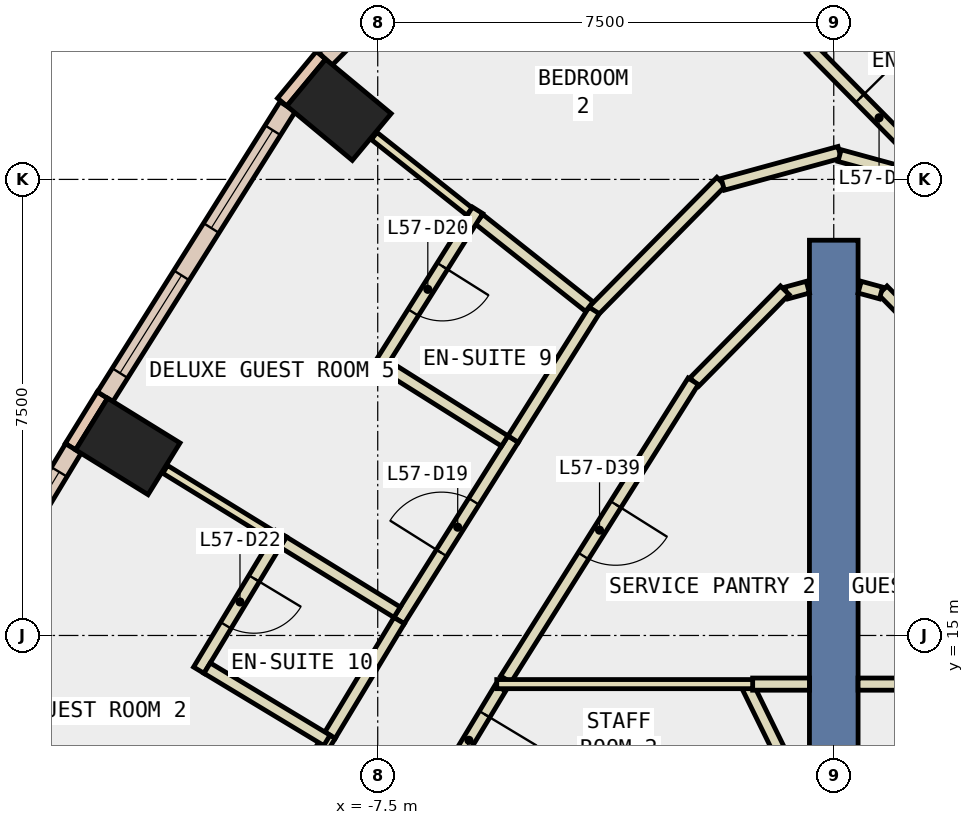
"""IFC4 building model, lengths in metres.
Left out: names, types, materials, properties, quantities, classifications, styles, units other than length and angle.
Written with IfcOpenShell. Run it as: python <this file> out.ifc"""

import sys

from ifc_helpers import new_model, si_unit, direction, frame, frame_2d, origin, origin_2d, place, context, subcontext, project, spatial, rectangle, extrude, element, fill, save


model = new_model("IFC4")
c1 = context("Model", 3, precision=1e-05, world=origin(), true_north=direction((0.0, 1.0)))
c2 = subcontext(c1, "Body", "Model", "MODEL_VIEW")
j1 = project(units=[si_unit("LENGTHUNIT", "METRE"), si_unit("PLANEANGLEUNIT", "RADIAN")], contexts=[c1])
p1 = place(None, origin())
s1 = spatial("IfcSite", under=j1, at=p1, CompositionType="ELEMENT")
p2 = place(p1, origin())
s2 = spatial("IfcBuilding", under=s1, at=p2, CompositionType="ELEMENT")
p3 = place(p2, frame((0.0, 0.0, 252.2)))
s3 = spatial("IfcBuildingStorey", under=s2, at=p3, CompositionType="ELEMENT", Elevation=252.2)
for number, where, z_axis, x_axis in (
    (1, (-8.137, 23.645, -0.34), (0.0, 0.0, 1.0), (0.639, 0.769, 0.0)),
    (2, (-11.61, 18.109, -0.34), (0.0, 0.0, 1.0), (0.526, 0.851, 0.0)),
):
    element("IfcColumn", number, at=place(p3, frame(where, z_axis=z_axis, x_axis=x_axis)), inside=s3, PredefinedType="COLUMN", context=c2, shape_type="SweptSolid", body=[
        extrude(rectangle(XDim=1.0, YDim=1.4, at=origin_2d()), origin(), (0.0, 0.0, 1.0), 3.6),
    ])
p4 = place(p3, frame((0.0, 12.5, -0.34), z_axis=(0.0, 0.0, 1.0), x_axis=(0.0, 1.0, 0.0)))
e3 = element("IfcWall", 3, at=p4, inside=s3, PredefinedType="SHEAR", context=c2, shape_type="SweptSolid", body=[
    extrude(rectangle(XDim=9.0, YDim=0.8, at=frame_2d((4.5, 0.0))), origin(), (0.0, 0.0, 1.0), 3.6),
])
p5 = place(p3, frame((-8.433, 24.541, 0.0), z_axis=(0.0, 0.0, 1.0), x_axis=(-0.637972365578, -0.770059257953, 0.0)))
e4 = element("IfcWall", 4, at=p5, inside=s3, PredefinedType="STANDARD", context=c2, shape_type="SweptSolid", body=[
    extrude(rectangle(XDim=1.0, YDim=0.2, at=frame_2d((0.5, 0.0))), origin(), (0.0, 0.0, 1.0), 3.26),
])
p6 = place(p3, frame((-12.028, 18.955, 0.0), z_axis=(0.0, 0.0, 1.0), x_axis=(-0.525648735675, -0.850701714282, 0.0)))
e5 = element("IfcWall", 5, at=p6, inside=s3, PredefinedType="STANDARD", context=c2, shape_type="SweptSolid", body=[
    extrude(rectangle(XDim=1.0, YDim=0.2, at=frame_2d((0.5, 0.0))), origin(), (0.0, 0.0, 1.0), 3.26),
])
p7 = place(p3, frame((-5.455, 27.424, 0.0), z_axis=(0.0, 0.0, 1.0), x_axis=(-0.702488411246, -0.711695181989, 0.0)))
e6 = element("IfcWall", 6, at=p7, inside=s3, PredefinedType="STANDARD", context=c2, shape_type="SweptSolid", body=[
    extrude(rectangle(XDim=4.137, YDim=0.3, at=frame_2d((2.068, 0.0))), origin(), (0.0, 0.0, 1.0), 3.26),
])
p8 = place(p7, frame((1.368, 0.0, 0.9)))
e7 = element("IfcOpeningElement", 7, at=p8, cuts=e6, PredefinedType="OPENING", context=c2, shape_type="SweptSolid", body=[
    extrude(rectangle(XDim=1.4, YDim=2.0, at=frame_2d((0.7, 1.0))), frame((0.0, 0.16, 0.0), z_axis=(0.0, -1.0, 0.0), x_axis=(1.0, 0.0, 0.0)), (0.0, 0.0, 1.0), 0.32),
])
p9 = place(p3, frame((-8.981, 23.697, 0.0), z_axis=(0.0, 0.0, 1.0), x_axis=(-0.532558226688, -0.846393369059, 0.0)))
e8 = element("IfcWall", 8, at=p9, inside=s3, PredefinedType="STANDARD", context=c2, shape_type="SweptSolid", body=[
    extrude(rectangle(XDim=5.637, YDim=0.3, at=frame_2d((2.818, 0.0))), origin(), (0.0, 0.0, 1.0), 3.26),
])
p10 = place(p9, frame((0.459, 0.0, 0.9)))
e9 = element("IfcOpeningElement", 9, at=p10, cuts=e8, PredefinedType="OPENING", context=c2, shape_type="SweptSolid", body=[
    extrude(rectangle(XDim=1.9, YDim=2.0, at=frame_2d((0.95, 1.0))), frame((0.0, 0.16, 0.0), z_axis=(0.0, -1.0, 0.0), x_axis=(1.0, 0.0, 0.0)), (0.0, 0.0, 1.0), 0.32),
])
p11 = place(p9, frame((3.278, 0.0, 0.9)))
e10 = element("IfcOpeningElement", 10, at=p11, cuts=e8, PredefinedType="OPENING", context=c2, shape_type="SweptSolid", body=[
    extrude(rectangle(XDim=1.9, YDim=2.0, at=frame_2d((0.95, 1.0))), frame((0.0, 0.16, 0.0), z_axis=(0.0, -1.0, 0.0), x_axis=(1.0, 0.0, 0.0)), (0.0, 0.0, 1.0), 0.32),
])
p12 = place(p3, frame((-12.506, 18.076, 0.0), z_axis=(0.0, 0.0, 1.0), x_axis=(-0.516269519619, -0.856426169096, 0.0)))
e11 = element("IfcWall", 11, at=p12, inside=s3, PredefinedType="STANDARD", context=c2, shape_type="SweptSolid", body=[
    extrude(rectangle(XDim=5.603, YDim=0.3, at=frame_2d((2.802, 0.0))), origin(), (0.0, 0.0, 1.0), 3.26),
])
p13 = place(p12, frame((0.451, 0.0, 0.9)))
e12 = element("IfcOpeningElement", 12, at=p13, cuts=e11, PredefinedType="OPENING", context=c2, shape_type="SweptSolid", body=[
    extrude(rectangle(XDim=1.9, YDim=2.0, at=frame_2d((0.95, 1.0))), frame((0.0, 0.16, 0.0), z_axis=(0.0, -1.0, 0.0), x_axis=(1.0, 0.0, 0.0)), (0.0, 0.0, 1.0), 0.32),
])
p14 = place(p12, frame((3.253, 0.0, 0.9)))
e13 = element("IfcOpeningElement", 13, at=p14, cuts=e11, PredefinedType="OPENING", context=c2, shape_type="SweptSolid", body=[
    extrude(rectangle(XDim=1.9, YDim=2.0, at=frame_2d((0.95, 1.0))), frame((0.0, 0.16, 0.0), z_axis=(0.0, -1.0, 0.0), x_axis=(1.0, 0.0, 0.0)), (0.0, 0.0, 1.0), 0.32),
])
p15 = place(p3, frame((-0.6, 12.5, 0.0), z_axis=(0.0, 0.0, 1.0), x_axis=(-0.440531456598, 0.897737175206, 0.0)))
e14 = element("IfcWall", 14, at=p15, inside=s3, PredefinedType="PARTITIONING", context=c2, shape_type="SweptSolid", body=[
    extrude(rectangle(XDim=1.918, YDim=0.2, at=frame_2d((0.959, 0.0))), origin(), (0.0, 0.0, 1.0), 3.26),
])
p16 = place(p3, frame((-5.482, 14.136, 0.0), z_axis=(0.0, 0.0, 1.0), x_axis=(-0.516156559549, -0.856494253357, 0.0)))
e15 = element("IfcWall", 15, at=p16, inside=s3, PredefinedType="PARTITIONING", context=c2, shape_type="SweptSolid", body=[
    extrude(rectangle(XDim=2.009, YDim=0.2, at=frame_2d((1.005, 0.0))), origin(), (0.0, 0.0, 1.0), 3.26),
])
p17 = place(p16, frame((0.504, 0.0, 0.0)))
e16 = element("IfcOpeningElement", 16, at=p17, cuts=e15, PredefinedType="OPENING", context=c2, shape_type="SweptSolid", body=[
    extrude(rectangle(XDim=1.0, YDim=2.1, at=frame_2d((0.5, 1.05))), frame((0.0, 0.11, 0.0), z_axis=(0.0, -1.0, 0.0), x_axis=(1.0, 0.0, 0.0)), (0.0, 0.0, 1.0), 0.22),
])
p18 = place(p3, frame((0.4, 14.2, 0.0), z_axis=(0.0, 0.0, 1.0), x_axis=(1.0, 0.0, 0.0)))
e17 = element("IfcWall", 17, at=p18, inside=s3, PredefinedType="PARTITIONING", context=c2, shape_type="SweptSolid", body=[
    extrude(rectangle(XDim=5.143, YDim=0.2, at=frame_2d((2.572, 0.0))), origin(), (0.0, 0.0, 1.0), 3.26),
])
p19 = place(p3, frame((2.294, 19.167, 0.0), z_axis=(0.0, 0.0, 1.0), x_axis=(-0.70213913596, 0.712039769784, 0.0)))
e18 = element("IfcWall", 18, at=p19, inside=s3, PredefinedType="PARTITIONING", context=c2, shape_type="SweptSolid", body=[
    extrude(rectangle(XDim=2.121, YDim=0.2, at=frame_2d((1.06, 0.0))), origin(), (0.0, 0.0, 1.0), 3.26),
])
p20 = place(p3, frame((0.778, 20.632, 0.0), z_axis=(0.0, 0.0, 1.0), x_axis=(-0.964810127056, 0.262947558899, 0.0)))
e19 = element("IfcWall", 19, at=p20, inside=s3, PredefinedType="PARTITIONING", context=c2, shape_type="SweptSolid", body=[
    extrude(rectangle(XDim=0.365, YDim=0.2, at=frame_2d((0.183, 0.0))), origin(), (0.0, 0.0, 1.0), 3.26),
])
p21 = place(p3, frame((-1.334, 14.2, 0.0), z_axis=(0.0, 0.0, 1.0), x_axis=(1.0, 0.0, 0.0)))
e20 = element("IfcWall", 20, at=p21, inside=s3, PredefinedType="PARTITIONING", context=c2, shape_type="SweptSolid", body=[
    extrude(rectangle(XDim=0.934, YDim=0.2, at=frame_2d((0.467, 0.0))), origin(), (0.0, 0.0, 1.0), 3.26),
])
p22 = place(p3, frame((-0.426, 20.728, 0.0), z_axis=(0.0, 0.0, 1.0), x_axis=(-0.964810127056, -0.262947558899, 0.0)))
e21 = element("IfcWall", 21, at=p22, inside=s3, PredefinedType="PARTITIONING", context=c2, shape_type="SweptSolid", body=[
    extrude(rectangle(XDim=0.365, YDim=0.2, at=frame_2d((0.183, 0.0))), origin(), (0.0, 0.0, 1.0), 3.26),
])
p23 = place(p3, frame((-0.805, 20.677, 0.0), z_axis=(0.0, 0.0, 1.0), x_axis=(-0.70213913596, -0.712039769784, 0.0)))
e22 = element("IfcWall", 22, at=p23, inside=s3, PredefinedType="PARTITIONING", context=c2, shape_type="SweptSolid", body=[
    extrude(rectangle(XDim=2.121, YDim=0.2, at=frame_2d((1.06, 0.0))), origin(), (0.0, 0.0, 1.0), 3.26),
])
p24 = place(p3, frame((-2.311, 19.181, 0.0), z_axis=(0.0, 0.0, 1.0), x_axis=(-0.532551510955, -0.846397594621, 0.0)))
e23 = element("IfcWall", 23, at=p24, inside=s3, PredefinedType="PARTITIONING", context=c2, shape_type="SweptSolid", body=[
    extrude(rectangle(XDim=5.789, YDim=0.2, at=frame_2d((2.895, 0.0))), origin(), (0.0, 0.0, 1.0), 3.26),
])
p25 = place(p24, frame((2.394, 0.0, 0.0)))
e24 = element("IfcOpeningElement", 24, at=p25, cuts=e23, PredefinedType="OPENING", context=c2, shape_type="SweptSolid", body=[
    extrude(rectangle(XDim=1.0, YDim=2.1, at=frame_2d((0.5, 1.05))), frame((0.0, 0.11, 0.0), z_axis=(0.0, -1.0, 0.0), x_axis=(1.0, 0.0, 0.0)), (0.0, 0.0, 1.0), 0.22),
])
p26 = place(p3, frame((-4.012, 20.275, 0.0), z_axis=(0.0, 0.0, 1.0), x_axis=(0.702488437915, 0.711695155664, 0.0)))
e25 = element("IfcWall", 25, at=p26, inside=s3, PredefinedType="PARTITIONING", context=c2, shape_type="SweptSolid", body=[
    extrude(rectangle(XDim=3.076, YDim=0.2, at=frame_2d((1.538, 0.0))), origin(), (0.0, 0.0, 1.0), 3.26),
])
p27 = place(p3, frame((-1.825, 22.419, 0.0), z_axis=(0.0, 0.0, 1.0), x_axis=(0.964477541401, 0.26416485787, 0.0)))
e26 = element("IfcWall", 26, at=p27, inside=s3, PredefinedType="PARTITIONING", context=c2, shape_type="SweptSolid", body=[
    extrude(rectangle(XDim=1.992, YDim=0.2, at=frame_2d((0.996, 0.0))), origin(), (0.0, 0.0, 1.0), 3.26),
])
p28 = place(p3, frame((0.096, 22.892, 0.0), z_axis=(0.0, 0.0, 1.0), x_axis=(0.964519582336, -0.264011316595, 0.0)))
e27 = element("IfcWall", 27, at=p28, inside=s3, PredefinedType="PARTITIONING", context=c2, shape_type="SweptSolid", body=[
    extrude(rectangle(XDim=1.849, YDim=0.2, at=frame_2d((0.924, 0.0))), origin(), (0.0, 0.0, 1.0), 3.26),
])
p29 = place(p3, frame((-7.15, 15.246, 0.0), z_axis=(0.0, 0.0, 1.0), x_axis=(0.532449518014, 0.846461759778, 0.0)))
e28 = element("IfcWall", 28, at=p29, inside=s3, PredefinedType="PARTITIONING", context=c2, shape_type="SweptSolid", body=[
    extrude(rectangle(XDim=3.525, YDim=0.2, at=frame_2d((1.763, 0.0))), origin(), (0.0, 0.0, 1.0), 3.26),
])
p30 = place(p29, frame((1.313, 0.0, 0.0)))
e29 = element("IfcOpeningElement", 29, at=p30, cuts=e28, PredefinedType="OPENING", context=c2, shape_type="SweptSolid", body=[
    extrude(rectangle(XDim=1.0, YDim=2.1, at=frame_2d((0.5, 1.05))), frame((0.0, 0.11, 0.0), z_axis=(0.0, -1.0, 0.0), x_axis=(1.0, 0.0, 0.0)), (0.0, 0.0, 1.0), 0.22),
])
p31 = place(p3, frame((-5.273, 18.23, 0.0), z_axis=(0.0, 0.0, 1.0), x_axis=(0.532743344325, 0.846276863135, 0.0)))
e30 = element("IfcWall", 30, at=p31, inside=s3, PredefinedType="PARTITIONING", context=c2, shape_type="SweptSolid", body=[
    extrude(rectangle(XDim=2.5, YDim=0.2, at=frame_2d((1.25, 0.0))), origin(), (0.0, 0.0, 1.0), 3.26),
])
p32 = place(p3, frame((-10.498, 9.689, 0.0), z_axis=(0.0, 0.0, 1.0), x_axis=(0.516353342298, 0.856375633643, 0.0)))
e31 = element("IfcWall", 31, at=p32, inside=s3, PredefinedType="PARTITIONING", context=c2, shape_type="SweptSolid", body=[
    extrude(rectangle(XDim=4.288, YDim=0.2, at=frame_2d((2.144, 0.0))), origin(), (0.0, 0.0, 1.0), 3.26),
])
p33 = place(p32, frame((1.694, 0.0, 0.0)))
e32 = element("IfcOpeningElement", 32, at=p33, cuts=e31, PredefinedType="OPENING", context=c2, shape_type="SweptSolid", body=[
    extrude(rectangle(XDim=1.0, YDim=2.1, at=frame_2d((0.5, 1.05))), frame((0.0, 0.11, 0.0), z_axis=(0.0, -1.0, 0.0), x_axis=(1.0, 0.0, 0.0)), (0.0, 0.0, 1.0), 0.22),
])
p34 = place(p3, frame((-8.284, 13.361, 0.0), z_axis=(0.0, 0.0, 1.0), x_axis=(0.516354965559, 0.856374654893, 0.0)))
e33 = element("IfcWall", 33, at=p34, inside=s3, PredefinedType="PARTITIONING", context=c2, shape_type="SweptSolid", body=[
    extrude(rectangle(XDim=2.2, YDim=0.2, at=frame_2d((1.1, 0.0))), origin(), (0.0, 0.0, 1.0), 3.26),
])
p35 = place(p3, frame((-1.334, 14.2, 0.0), z_axis=(0.0, 0.0, 1.0), x_axis=(-1.0, 0.0, 0.0)))
e34 = element("IfcWall", 34, at=p35, inside=s3, PredefinedType="PARTITIONING", context=c2, shape_type="SweptSolid", body=[
    extrude(rectangle(XDim=4.209, YDim=0.15, at=frame_2d((2.104, 0.0))), origin(), (0.0, 0.0, 1.0), 3.26),
])
p36 = place(p3, frame((1.506, 26.372, 0.0), z_axis=(0.0, 0.0, 1.0), x_axis=(-0.711773999329, -0.702408551969, 0.0)))
e35 = element("IfcWall", 35, at=p36, inside=s3, PredefinedType="PARTITIONING", context=c2, shape_type="SweptSolid", body=[
    extrude(rectangle(XDim=2.45, YDim=0.2, at=frame_2d((1.225, 0.0))), origin(), (0.0, 0.0, 1.0), 3.26),
])
p37 = place(p3, frame((-0.379, 24.652, 0.0), z_axis=(0.0, 0.0, 1.0), x_axis=(0.702559610983, -0.711624896286, 0.0)))
e36 = element("IfcWall", 36, at=p37, inside=s3, PredefinedType="PARTITIONING", context=c2, shape_type="SweptSolid", body=[
    extrude(rectangle(XDim=3.124, YDim=0.2, at=frame_2d((1.562, 0.0))), origin(), (0.0, 0.0, 1.0), 3.26),
])
p38 = place(p37, frame((1.15, 0.0, 0.0)))
e37 = element("IfcOpeningElement", 37, at=p38, cuts=e36, PredefinedType="OPENING", context=c2, shape_type="SweptSolid", body=[
    extrude(rectangle(XDim=0.9, YDim=2.1, at=frame_2d((0.45, 1.05))), frame((0.0, 0.11, 0.0), z_axis=(0.0, -1.0, 0.0), x_axis=(1.0, 0.0, 0.0)), (0.0, 0.0, 1.0), 0.22),
])
p39 = place(p3, frame((-5.99, 21.97, 0.0), z_axis=(0.0, 0.0, 1.0), x_axis=(-0.783573405437, 0.621299218003, 0.0)))
e38 = element("IfcWall", 38, at=p39, inside=s3, PredefinedType="PARTITIONING", context=c2, shape_type="SweptSolid", body=[
    extrude(rectangle(XDim=2.002, YDim=0.15, at=frame_2d((1.001, 0.0))), origin(), (0.0, 0.0, 1.0), 3.26),
])
p40 = place(p3, frame((-4.02, 20.408, 0.0), z_axis=(0.0, 0.0, 1.0), x_axis=(-0.783681902275, 0.621162358846, 0.0)))
e39 = element("IfcWall", 39, at=p40, inside=s3, PredefinedType="PARTITIONING", context=c2, shape_type="SweptSolid", body=[
    extrude(rectangle(XDim=2.313, YDim=0.2, at=frame_2d((1.157, 0.0))), origin(), (0.0, 0.0, 1.0), 3.26),
])
p41 = place(p3, frame((-5.858, 21.992, 0.0), z_axis=(0.0, 0.0, 1.0), x_axis=(-0.532874387162, -0.846194355634, 0.0)))
e40 = element("IfcWall", 40, at=p41, inside=s3, PredefinedType="PARTITIONING", context=c2, shape_type="SweptSolid", body=[
    extrude(rectangle(XDim=3.073, YDim=0.2, at=frame_2d((1.536, 0.0))), origin(), (0.0, 0.0, 1.0), 3.26),
])
p42 = place(p41, frame((1.086, 0.0, 0.0)))
e41 = element("IfcOpeningElement", 41, at=p42, cuts=e40, PredefinedType="OPENING", context=c2, shape_type="SweptSolid", body=[
    extrude(rectangle(XDim=0.9, YDim=2.1, at=frame_2d((0.45, 1.05))), frame((0.0, 0.11, 0.0), z_axis=(0.0, -1.0, 0.0), x_axis=(1.0, 0.0, 0.0)), (0.0, 0.0, 1.0), 0.22),
])
p43 = place(p3, frame((-7.357, 19.423, 0.0), z_axis=(0.0, 0.0, 1.0), x_axis=(0.846270070045, -0.532754135176, 0.0)))
e42 = element("IfcWall", 42, at=p43, inside=s3, PredefinedType="PARTITIONING", context=c2, shape_type="SweptSolid", body=[
    extrude(rectangle(XDim=2.3, YDim=0.2, at=frame_2d((1.15, 0.0))), origin(), (0.0, 0.0, 1.0), 3.26),
])
p44 = place(p3, frame((-9.225, 16.641, 0.0), z_axis=(0.0, 0.0, 1.0), x_axis=(-0.85144868382, 0.524437926566, 0.0)))
e43 = element("IfcWall", 43, at=p44, inside=s3, PredefinedType="PARTITIONING", context=c2, shape_type="SweptSolid", body=[
    extrude(rectangle(XDim=2.08, YDim=0.15, at=frame_2d((1.04, 0.0))), origin(), (0.0, 0.0, 1.0), 3.26),
])
p45 = place(p3, frame((-7.182, 15.383, 0.0), z_axis=(0.0, 0.0, 1.0), x_axis=(-0.851498142432, 0.524357619792, 0.0)))
e44 = element("IfcWall", 44, at=p45, inside=s3, PredefinedType="PARTITIONING", context=c2, shape_type="SweptSolid", body=[
    extrude(rectangle(XDim=2.198, YDim=0.2, at=frame_2d((1.099, 0.0))), origin(), (0.0, 0.0, 1.0), 3.26),
])
p46 = place(p3, frame((-9.088, 16.674, 0.0), z_axis=(0.0, 0.0, 1.0), x_axis=(-0.516780274192, -0.856118069081, 0.0)))
e45 = element("IfcWall", 45, at=p46, inside=s3, PredefinedType="PARTITIONING", context=c2, shape_type="SweptSolid", body=[
    extrude(rectangle(XDim=2.623, YDim=0.2, at=frame_2d((1.311, 0.0))), origin(), (0.0, 0.0, 1.0), 3.26),
])
p47 = place(p46, frame((0.861, 0.0, 0.0)))
e46 = element("IfcOpeningElement", 46, at=p47, cuts=e45, PredefinedType="OPENING", context=c2, shape_type="SweptSolid", body=[
    extrude(rectangle(XDim=0.9, YDim=2.1, at=frame_2d((0.45, 1.05))), frame((0.0, 0.11, 0.0), z_axis=(0.0, -1.0, 0.0), x_axis=(1.0, 0.0, 0.0)), (0.0, 0.0, 1.0), 0.22),
])
p48 = place(p3, frame((-10.306, 14.463, 0.0), z_axis=(0.0, 0.0, 1.0), x_axis=(0.856338986581, -0.51641411683, 0.0)))
e47 = element("IfcWall", 47, at=p48, inside=s3, PredefinedType="PARTITIONING", context=c2, shape_type="SweptSolid", body=[
    extrude(rectangle(XDim=2.301, YDim=0.2, at=frame_2d((1.15, 0.0))), origin(), (0.0, 0.0, 1.0), 3.26),
])
p49 = place(p10, origin())
e48 = element("IfcWindow", 48, at=p49, inside=s3, PartitioningType="SINGLE_PANEL", PredefinedType="WINDOW", context=c2, shape_type="SweptSolid", body=[
    extrude(rectangle(XDim=1.9, YDim=2.0, at=frame_2d((0.95, 1.0))), frame((0.0, 0.03, 0.0), z_axis=(0.0, -1.0, 0.0), x_axis=(1.0, 0.0, 0.0)), (0.0, 0.0, 1.0), 0.06),
])
fill(e9, e48)
p50 = place(p11, origin())
e49 = element("IfcWindow", 49, at=p50, inside=s3, PartitioningType="SINGLE_PANEL", PredefinedType="WINDOW", context=c2, shape_type="SweptSolid", body=[
    extrude(rectangle(XDim=1.9, YDim=2.0, at=frame_2d((0.95, 1.0))), frame((0.0, 0.03, 0.0), z_axis=(0.0, -1.0, 0.0), x_axis=(1.0, 0.0, 0.0)), (0.0, 0.0, 1.0), 0.06),
])
fill(e10, e49)
p51 = place(p13, origin())
e50 = element("IfcWindow", 50, at=p51, inside=s3, PartitioningType="SINGLE_PANEL", PredefinedType="WINDOW", context=c2, shape_type="SweptSolid", body=[
    extrude(rectangle(XDim=1.9, YDim=2.0, at=frame_2d((0.95, 1.0))), frame((0.0, 0.03, 0.0), z_axis=(0.0, -1.0, 0.0), x_axis=(1.0, 0.0, 0.0)), (0.0, 0.0, 1.0), 0.06),
])
fill(e12, e50)
p52 = place(p38, origin())
e51 = element("IfcDoor", 51, at=p52, inside=s3, OperationType="SINGLE_SWING_RIGHT", PredefinedType="DOOR", context=c2, shape_type="SweptSolid", body=[
    extrude(rectangle(XDim=0.9, YDim=2.1, at=frame_2d((0.45, 1.05))), frame((0.0, 0.025, 0.0), z_axis=(0.0, -1.0, 0.0), x_axis=(1.0, 0.0, 0.0)), (0.0, 0.0, 1.0), 0.05),
])
fill(e37, e51)
p53 = place(p30, origin())
e52 = element("IfcDoor", 52, at=p53, inside=s3, OperationType="SINGLE_SWING_RIGHT", PredefinedType="DOOR", context=c2, shape_type="SweptSolid", body=[
    extrude(rectangle(XDim=1.0, YDim=2.1, at=frame_2d((0.5, 1.05))), frame((0.0, 0.025, 0.0), z_axis=(0.0, -1.0, 0.0), x_axis=(1.0, 0.0, 0.0)), (0.0, 0.0, 1.0), 0.05),
])
fill(e29, e52)
p54 = place(p42, origin())
e53 = element("IfcDoor", 53, at=p54, inside=s3, OperationType="SINGLE_SWING_LEFT", PredefinedType="DOOR", context=c2, shape_type="SweptSolid", body=[
    extrude(rectangle(XDim=0.9, YDim=2.1, at=frame_2d((0.45, 1.05))), frame((0.0, 0.025, 0.0), z_axis=(0.0, -1.0, 0.0), x_axis=(1.0, 0.0, 0.0)), (0.0, 0.0, 1.0), 0.05),
])
fill(e41, e53)
p55 = place(p47, origin())
e54 = element("IfcDoor", 54, at=p55, inside=s3, OperationType="SINGLE_SWING_LEFT", PredefinedType="DOOR", context=c2, shape_type="SweptSolid", body=[
    extrude(rectangle(XDim=0.9, YDim=2.1, at=frame_2d((0.45, 1.05))), frame((0.0, 0.025, 0.0), z_axis=(0.0, -1.0, 0.0), x_axis=(1.0, 0.0, 0.0)), (0.0, 0.0, 1.0), 0.05),
])
fill(e46, e54)
p56 = place(p25, origin())
e55 = element("IfcDoor", 55, at=p56, inside=s3, OperationType="SINGLE_SWING_LEFT", PredefinedType="DOOR", context=c2, shape_type="SweptSolid", body=[
    extrude(rectangle(XDim=1.0, YDim=2.1, at=frame_2d((0.5, 1.05))), frame((0.0, 0.025, 0.0), z_axis=(0.0, -1.0, 0.0), x_axis=(1.0, 0.0, 0.0)), (0.0, 0.0, 1.0), 0.05),
])
fill(e24, e55)
p57 = place(p17, origin())
e56 = element("IfcDoor", 56, at=p57, inside=s3, OperationType="SINGLE_SWING_LEFT", PredefinedType="DOOR", context=c2, shape_type="SweptSolid", body=[
    extrude(rectangle(XDim=1.0, YDim=2.1, at=frame_2d((0.5, 1.05))), frame((0.0, 0.025, 0.0), z_axis=(0.0, -1.0, 0.0), x_axis=(1.0, 0.0, 0.0)), (0.0, 0.0, 1.0), 0.05),
])
fill(e16, e56)
save(model, sys.argv[1])
